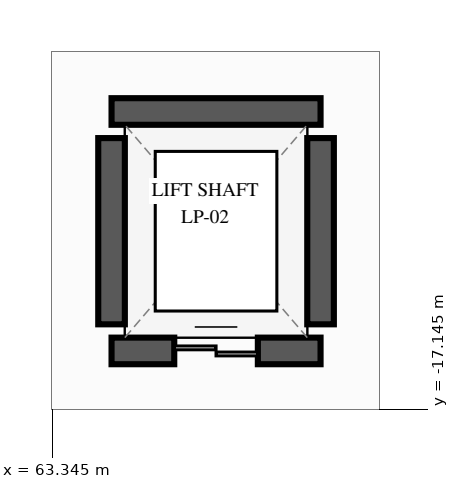
"""IFC4 building model, lengths in metres.
Left out: names, types, materials, properties, quantities, classifications, styles, units other than length and angle.
Written with IfcOpenShell. Run it as: python <this file> out.ifc"""

import sys

from ifc_helpers import new_model, si_unit, direction, frame, frame_2d, origin, place, context, subcontext, project, spatial, rectangle, extrude, element, fill, save


model = new_model("IFC4")
c1 = context("Model", 3, precision=1e-05, world=origin(), true_north=direction((0.0, 1.0)))
c2 = subcontext(c1, "Body", "Model", "MODEL_VIEW")
j1 = project(units=[si_unit("LENGTHUNIT", "METRE"), si_unit("PLANEANGLEUNIT", "RADIAN")], contexts=[c1])
p1 = place(None, origin())
s1 = spatial("IfcSite", under=j1, at=p1, CompositionType="ELEMENT")
p2 = place(p1, origin())
s2 = spatial("IfcBuilding", under=s1, at=p2, CompositionType="ELEMENT")
p3 = place(p2, frame((0.0, 0.0, 5.4)))
s3 = spatial("IfcBuildingStorey", under=s2, at=p3, CompositionType="ELEMENT", Elevation=5.4)
p4 = place(p3, frame((64.125, -16.375, 0.0), z_axis=(0.0, 0.0, 1.0), x_axis=(1.0, 0.0, 0.0)))
e1 = element("IfcWall", 1, at=p4, inside=s3, PredefinedType="SHEAR", context=c2, shape_type="SweptSolid", body=[
    extrude(rectangle(XDim=2.75, YDim=0.35, at=frame_2d((1.375, 0.0))), origin(), (0.0, 0.0, 1.0), 5.15),
])
p5 = place(p4, frame((0.825, 0.0, 0.0)))
e2 = element("IfcOpeningElement", 2, at=p5, cuts=e1, PredefinedType="OPENING", context=c2, shape_type="SweptSolid", body=[
    extrude(rectangle(XDim=1.1, YDim=2.2, at=frame_2d((0.55, 1.1))), frame((0.0, 0.185, 0.0), z_axis=(0.0, -1.0, 0.0), x_axis=(1.0, 0.0, 0.0)), (0.0, 0.0, 1.0), 0.37),
])
p6 = place(p3, frame((66.875, -13.225, 0.0), z_axis=(0.0, 0.0, 1.0), x_axis=(-1.0, 0.0, 0.0)))
e3 = element("IfcWall", 3, at=p6, inside=s3, PredefinedType="SHEAR", context=c2, shape_type="SweptSolid", body=[
    extrude(rectangle(XDim=2.75, YDim=0.35, at=frame_2d((1.375, 0.0))), origin(), (0.0, 0.0, 1.0), 5.15),
])
for number, where, z_axis, x_axis in (
    (4, (64.125, -16.025, 0.0), (0.0, 0.0, 1.0), (0.0, 1.0, 0.0)),
    (5, (66.875, -16.025, 0.0), (0.0, 0.0, 1.0), (0.0, 1.0, 0.0)),
):
    element("IfcWall", number, at=place(p3, frame(where, z_axis=z_axis, x_axis=x_axis)), inside=s3, PredefinedType="SHEAR", context=c2, shape_type="SweptSolid", body=[
        extrude(rectangle(XDim=2.45, YDim=0.35, at=frame_2d((1.225, 0.0))), origin(), (0.0, 0.0, 1.0), 5.15),
    ])
p7 = place(p5, origin())
e6 = element("IfcDoor", 6, at=p7, inside=s3, OperationType="DOUBLE_DOOR_SLIDING", PredefinedType="DOOR", context=c2, shape_type="SweptSolid", body=[
    extrude(rectangle(XDim=1.1, YDim=2.2, at=frame_2d((0.55, 1.1))), frame((0.0, 0.025, 0.0), z_axis=(0.0, -1.0, 0.0), x_axis=(1.0, 0.0, 0.0)), (0.0, 0.0, 1.0), 0.05),
])
fill(e2, e6)
save(model, sys.argv[1])
